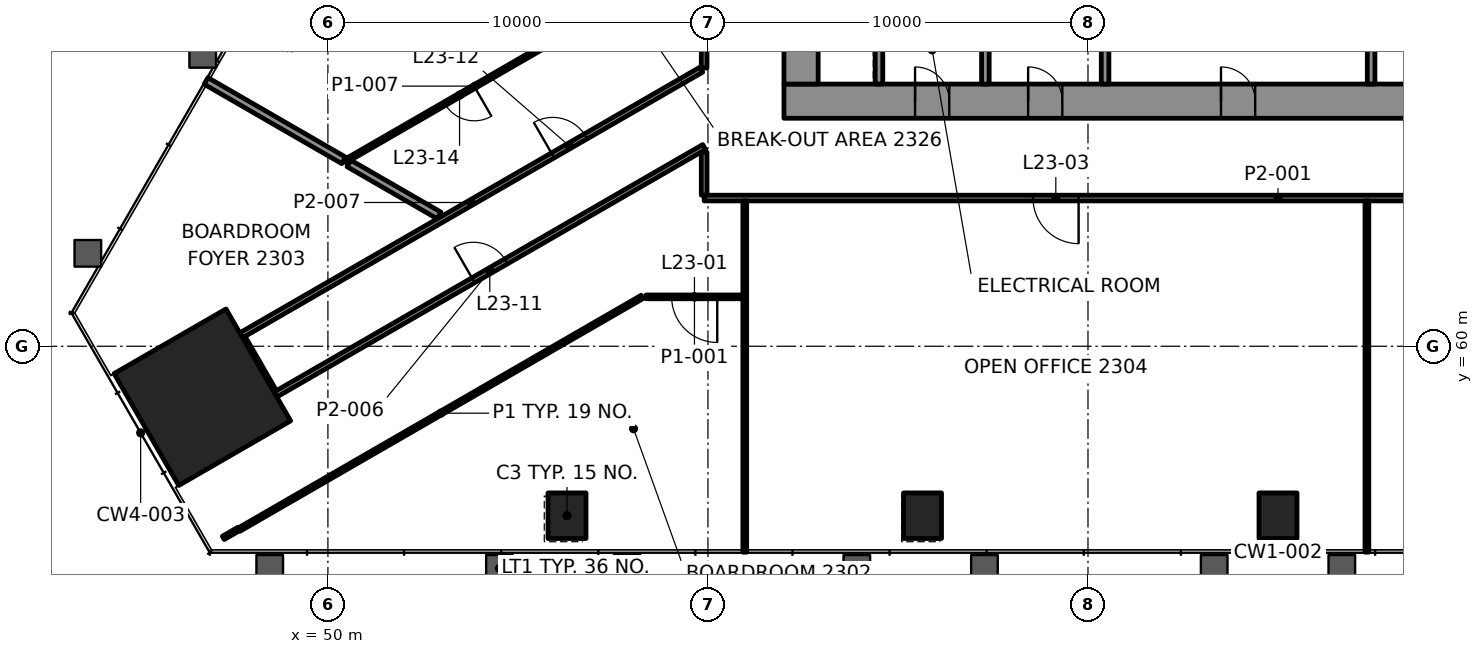
"""IFC4 building model, lengths in metres.
Left out: names, types, materials, properties, quantities, classifications, styles, units other than length and angle.
Written with IfcOpenShell. Run it as: python <this file> out.ifc"""

import sys

from ifc_helpers import new_model, si_unit, direction, frame, frame_2d, origin, origin_2d, place, context, subcontext, project, spatial, rectangle, extrude, element, fill, save


model = new_model("IFC4")
c1 = context("Model", 3, precision=1e-05, world=origin(), true_north=direction((0.0, 1.0)))
c2 = subcontext(c1, "Body", "Model", "MODEL_VIEW")
j1 = project(units=[si_unit("LENGTHUNIT", "METRE"), si_unit("PLANEANGLEUNIT", "RADIAN")], contexts=[c1])
p1 = place(None, origin())
s1 = spatial("IfcSite", under=j1, at=p1, CompositionType="ELEMENT")
p2 = place(p1, origin())
s2 = spatial("IfcBuilding", under=s1, at=p2, CompositionType="ELEMENT")
p3 = place(p2, frame((0.0, 0.0, 103.0)))
s3 = spatial("IfcBuildingStorey", under=s2, at=p3, CompositionType="ELEMENT", Elevation=103.0)
p4 = place(p3, frame((46.696, 58.659, 0.0), z_axis=(0.0, 0.0, 1.0), x_axis=(0.5, -0.866025403784, 0.0)))
e1 = element("IfcColumn", 1, at=p4, inside=s3, PredefinedType="COLUMN", context=c2, shape_type="SweptSolid", body=[
    extrude(rectangle(XDim=3.4, YDim=3.4, at=origin_2d()), origin(), (0.0, 0.0, 1.0), 4.2),
])
for number, where, z_axis, x_axis in (
    (2, (56.292, 55.541, -0.0), (0.0, 0.0, 1.0), (1.0, 0.0, 0.0)),
    (3, (65.646, 55.541, -0.0), (0.0, 0.0, 1.0), (1.0, 0.0, 0.0)),
    (4, (75.0, 55.541, -0.0), (0.0, 0.0, 1.0), (1.0, 0.0, 0.0)),
):
    element("IfcColumn", number, at=place(p3, frame(where, z_axis=z_axis, x_axis=x_axis)), inside=s3, PredefinedType="COLUMN", context=c2, shape_type="SweptSolid", body=[
        extrude(rectangle(XDim=1.0, YDim=1.2, at=origin_2d()), origin(), (0.0, 0.0, 1.0), 4.2),
    ])
p5 = place(p3, frame((62.0, 66.45, 0.0), z_axis=(0.0, 0.0, 1.0), x_axis=(1.0, 0.0, 0.0)))
e5 = element("IfcWall", 5, at=p5, inside=s3, PredefinedType="SHEAR", context=c2, shape_type="SweptSolid", body=[
    extrude(rectangle(XDim=26.0, YDim=0.9, at=frame_2d((13.0, 0.0))), origin(), (0.0, 0.0, 1.0), 4.0),
])
p6 = place(p5, frame((3.45, 0.0, 0.0)))
e6 = element("IfcOpeningElement", 6, at=p6, cuts=e5, PredefinedType="OPENING", context=c2, shape_type="SweptSolid", body=[
    extrude(rectangle(XDim=0.9, YDim=2.1, at=frame_2d((0.45, 1.05))), frame((0.0, 0.46, 0.0), z_axis=(0.0, -1.0, 0.0), x_axis=(1.0, 0.0, 0.0)), (0.0, 0.0, 1.0), 0.92),
])
p7 = place(p5, frame((6.425, 0.0, 0.0)))
e7 = element("IfcOpeningElement", 7, at=p7, cuts=e5, PredefinedType="OPENING", context=c2, shape_type="SweptSolid", body=[
    extrude(rectangle(XDim=0.9, YDim=2.1, at=frame_2d((0.45, 1.05))), frame((0.0, 0.46, 0.0), z_axis=(0.0, -1.0, 0.0), x_axis=(1.0, 0.0, 0.0)), (0.0, 0.0, 1.0), 0.92),
])
p8 = place(p5, frame((11.5, 0.0, 0.0)))
e8 = element("IfcOpeningElement", 8, at=p8, cuts=e5, PredefinedType="OPENING", context=c2, shape_type="SweptSolid", body=[
    extrude(rectangle(XDim=0.9, YDim=2.1, at=frame_2d((0.45, 1.05))), frame((0.0, 0.46, 0.0), z_axis=(0.0, -1.0, 0.0), x_axis=(1.0, 0.0, 0.0)), (0.0, 0.0, 1.0), 0.92),
])
p9 = place(p5, frame((18.5, 0.0, 0.0)))
e9 = element("IfcOpeningElement", 9, at=p9, cuts=e5, PredefinedType="OPENING", context=c2, shape_type="SweptSolid", body=[
    extrude(rectangle(XDim=0.9, YDim=2.1, at=frame_2d((0.45, 1.05))), frame((0.0, 0.46, 0.0), z_axis=(0.0, -1.0, 0.0), x_axis=(1.0, 0.0, 0.0)), (0.0, 0.0, 1.0), 0.92),
])
p10 = place(p5, frame((23.325, 0.0, 0.0)))
e10 = element("IfcOpeningElement", 10, at=p10, cuts=e5, PredefinedType="OPENING", context=c2, shape_type="SweptSolid", body=[
    extrude(rectangle(XDim=0.9, YDim=2.1, at=frame_2d((0.45, 1.05))), frame((0.0, 0.46, 0.0), z_axis=(0.0, -1.0, 0.0), x_axis=(1.0, 0.0, 0.0)), (0.0, 0.0, 1.0), 0.92),
])
p11 = place(p3, frame((62.45, 66.9, 0.0), z_axis=(0.0, 0.0, 1.0), x_axis=(0.0, 1.0, 0.0)))
e11 = element("IfcWall", 11, at=p11, inside=s3, PredefinedType="SHEAR", context=c2, shape_type="SweptSolid", body=[
    extrude(rectangle(XDim=16.2, YDim=0.9, at=frame_2d((8.1, 0.0))), origin(), (0.0, 0.0, 1.0), 4.0),
])
p12 = place(p11, frame((5.5, 0.0, 0.0)))
e12 = element("IfcOpeningElement", 12, at=p12, cuts=e11, PredefinedType="OPENING", context=c2, shape_type="SweptSolid", body=[
    extrude(rectangle(XDim=1.8, YDim=2.1, at=frame_2d((0.9, 1.05))), frame((0.0, 0.46, 0.0), z_axis=(0.0, -1.0, 0.0), x_axis=(1.0, 0.0, 0.0)), (0.0, 0.0, 1.0), 0.92),
])
p13 = place(p3, frame((60.919, 61.3, 0.0), z_axis=(0.0, 0.0, 1.0), x_axis=(-1.0, 0.0, 0.0)))
e13 = element("IfcWall", 13, at=p13, inside=s3, PredefinedType="PARTITIONING", context=c2, shape_type="SweptSolid", body=[
    extrude(rectangle(XDim=2.548, YDim=0.1, at=frame_2d((1.274, 0.0))), origin(), (0.0, 0.0, 1.0), 3.4),
])
p14 = place(p13, frame((0.674, 0.0, 0.0)))
e14 = element("IfcOpeningElement", 14, at=p14, cuts=e13, PredefinedType="OPENING", context=c2, shape_type="SweptSolid", body=[
    extrude(rectangle(XDim=1.2, YDim=2.1, at=frame_2d((0.6, 1.05))), frame((0.0, 0.06, 0.0), z_axis=(0.0, -1.0, 0.0), x_axis=(1.0, 0.0, 0.0)), (0.0, 0.0, 1.0), 0.12),
])
p15 = place(p3, frame((90.099, 63.9, 0.0), z_axis=(0.0, 0.0, 1.0), x_axis=(-1.0, 0.0, 0.0)))
e15 = element("IfcWall", 15, at=p15, inside=s3, PredefinedType="PARTITIONING", context=c2, shape_type="SweptSolid", body=[
    extrude(rectangle(XDim=30.199, YDim=0.15, at=frame_2d((15.099, 0.0))), origin(), (0.0, 0.0, 1.0), 3.4),
])
p16 = place(p15, frame((5.882, 0.0, 0.0)))
e16 = element("IfcOpeningElement", 16, at=p16, cuts=e15, PredefinedType="OPENING", context=c2, shape_type="SweptSolid", body=[
    extrude(rectangle(XDim=1.2, YDim=2.1, at=frame_2d((0.6, 1.05))), frame((0.0, 0.085, 0.0), z_axis=(0.0, -1.0, 0.0), x_axis=(1.0, 0.0, 0.0)), (0.0, 0.0, 1.0), 0.17),
])
p17 = place(p15, frame((20.346, 0.0, 0.0)))
e17 = element("IfcOpeningElement", 17, at=p17, cuts=e15, PredefinedType="OPENING", context=c2, shape_type="SweptSolid", body=[
    extrude(rectangle(XDim=1.2, YDim=2.1, at=frame_2d((0.6, 1.05))), frame((0.0, 0.085, 0.0), z_axis=(0.0, -1.0, 0.0), x_axis=(1.0, 0.0, 0.0)), (0.0, 0.0, 1.0), 0.17),
])
p18 = place(p3, frame((47.667, 55.178, 0.0), z_axis=(0.0, 0.0, 1.0), x_axis=(0.866022223021, 0.500005509203, 0.0)))
e18 = element("IfcWall", 18, at=p18, inside=s3, PredefinedType="PARTITIONING", context=c2, shape_type="SweptSolid", body=[
    extrude(rectangle(XDim=12.244, YDim=0.1, at=frame_2d((6.122, 0.0))), origin(), (0.0, 0.0, 1.0), 3.4),
])
p19 = place(p3, frame((47.248, 54.958, 0.0), z_axis=(0.0, 0.0, 1.0), x_axis=(0.865944638795, 0.50013986298, 0.0)))
e19 = element("IfcWall", 19, at=p19, inside=s3, PredefinedType="PARTITIONING", context=c2, shape_type="SweptSolid", body=[
    extrude(rectangle(XDim=0.472, YDim=0.1, at=frame_2d((0.236, 0.0))), origin(), (0.0, 0.0, 1.0), 3.4),
])
p20 = place(p3, frame((48.619, 58.73, 0.0), z_axis=(0.0, 0.0, 1.0), x_axis=(0.866022351388, 0.500005286868, 0.0)))
e20 = element("IfcWall", 20, at=p20, inside=s3, PredefinedType="PARTITIONING", context=c2, shape_type="SweptSolid", body=[
    extrude(rectangle(XDim=13.026, YDim=0.15, at=frame_2d((6.513, 0.0))), origin(), (0.0, 0.0, 1.0), 3.247),
])
p21 = place(p20, frame((6.013, 0.0, 0.0)))
e21 = element("IfcOpeningElement", 21, at=p21, cuts=e20, PredefinedType="OPENING", context=c2, shape_type="SweptSolid", body=[
    extrude(rectangle(XDim=1.0, YDim=2.1, at=frame_2d((0.5, 1.05))), frame((0.0, 0.085, 0.0), z_axis=(0.0, -1.0, 0.0), x_axis=(1.0, 0.0, 0.0)), (0.0, 0.0, 1.0), 0.17),
])
p22 = place(p3, frame((47.719, 60.289, 0.0), z_axis=(0.0, 0.0, 1.0), x_axis=(0.866025916507, 0.499999111938, 0.0)))
e22 = element("IfcWall", 22, at=p22, inside=s3, PredefinedType="PARTITIONING", context=c2, shape_type="SweptSolid", body=[
    extrude(rectangle(XDim=13.979, YDim=0.15, at=frame_2d((6.99, 0.0))), origin(), (0.0, 0.0, 1.0), 3.4),
])
p23 = place(p22, frame((9.467, 0.0, 0.0)))
e23 = element("IfcOpeningElement", 23, at=p23, cuts=e22, PredefinedType="OPENING", context=c2, shape_type="SweptSolid", body=[
    extrude(rectangle(XDim=1.0, YDim=2.1, at=frame_2d((0.5, 1.05))), frame((0.0, 0.085, 0.0), z_axis=(0.0, -1.0, 0.0), x_axis=(1.0, 0.0, 0.0)), (0.0, 0.0, 1.0), 0.17),
])
p24 = place(p3, frame((57.3, 68.823, 0.0), z_axis=(0.0, 0.0, 1.0), x_axis=(-0.866030292833, -0.499991531824, 0.0)))
e24 = element("IfcWall", 24, at=p24, inside=s3, PredefinedType="PARTITIONING", context=c2, shape_type="SweptSolid", body=[
    extrude(rectangle(XDim=7.906, YDim=0.1, at=frame_2d((3.953, 0.0))), origin(), (0.0, 0.0, 1.0), 3.4),
])
p25 = place(p24, frame((0.229, 0.0, 0.0)))
e25 = element("IfcOpeningElement", 25, at=p25, cuts=e24, PredefinedType="OPENING", context=c2, shape_type="SweptSolid", body=[
    extrude(rectangle(XDim=0.9, YDim=2.1, at=frame_2d((0.45, 1.05))), frame((0.0, 0.06, 0.0), z_axis=(0.0, -1.0, 0.0), x_axis=(1.0, 0.0, 0.0)), (0.0, 0.0, 1.0), 0.12),
])
p26 = place(p24, frame((3.979, 0.0, 0.0)))
e26 = element("IfcOpeningElement", 26, at=p26, cuts=e24, PredefinedType="OPENING", context=c2, shape_type="SweptSolid", body=[
    extrude(rectangle(XDim=0.9, YDim=2.1, at=frame_2d((0.45, 1.05))), frame((0.0, 0.06, 0.0), z_axis=(0.0, -1.0, 0.0), x_axis=(1.0, 0.0, 0.0)), (0.0, 0.0, 1.0), 0.12),
])
for number, where, z_axis, x_axis in (
    (27, (77.339, 54.581, 0.0), (0.0, 0.0, 1.0), (0.0, 1.0, 0.0)),
    (28, (60.969, 54.581, 0.0), (0.0, 0.0, 1.0), (0.0, 1.0, 0.0)),
):
    element("IfcWall", number, at=place(p3, frame(where, z_axis=z_axis, x_axis=x_axis)), inside=s3, PredefinedType="PARTITIONING", context=c2, shape_type="SweptSolid", body=[
        extrude(rectangle(XDim=9.244, YDim=0.1, at=frame_2d((4.622, 0.0))), origin(), (0.0, 0.0, 1.0), 3.165),
    ])
p27 = place(p3, frame((59.9, 63.976, 0.0), z_axis=(0.0, 0.0, 1.0), x_axis=(0.0, 1.0, 0.0)))
e29 = element("IfcWall", 29, at=p27, inside=s3, PredefinedType="PARTITIONING", context=c2, shape_type="SweptSolid", body=[
    extrude(rectangle(XDim=1.131, YDim=0.15, at=frame_2d((0.565, 0.0))), origin(), (0.0, 0.0, 1.0), 3.247),
])
p28 = place(p3, frame((59.9, 67.321, 0.0), z_axis=(0.0, 0.0, 1.0), x_axis=(0.0, 1.0, 0.0)))
e30 = element("IfcWall", 30, at=p28, inside=s3, PredefinedType="PARTITIONING", context=c2, shape_type="SweptSolid", body=[
    extrude(rectangle(XDim=18.778, YDim=0.15, at=frame_2d((9.389, 0.0))), origin(), (0.0, 0.0, 1.0), 3.4),
])
p29 = place(p3, frame((48.58, 58.794, 0.0), z_axis=(0.0, 0.0, 1.0), x_axis=(-0.499944585209, 0.866057395165, 0.0)))
e31 = element("IfcWall", 31, at=p29, inside=s3, PredefinedType="PARTITIONING", context=c2, shape_type="SweptSolid", body=[
    extrude(rectangle(XDim=1.649, YDim=0.15, at=frame_2d((0.825, 0.0))), origin(), (0.0, 0.0, 1.0), 3.247),
])
p30 = place(p3, frame((52.926, 63.441, 0.0), z_axis=(0.0, 0.0, 1.0), x_axis=(-0.866019409031, 0.500010383074, 0.0)))
e32 = element("IfcWall", 32, at=p30, inside=s3, PredefinedType="PARTITIONING", context=c2, shape_type="SweptSolid", body=[
    extrude(rectangle(XDim=2.74, YDim=0.2, at=frame_2d((1.37, 0.0))), origin(), (0.0, 0.0, 1.0), 3.4),
])
p31 = place(p3, frame((50.416, 64.891, 0.0), z_axis=(0.0, 0.0, 1.0), x_axis=(-0.866054366634, 0.499949831517, 0.0)))
e33 = element("IfcWall", 33, at=p31, inside=s3, PredefinedType="PARTITIONING", context=c2, shape_type="SweptSolid", body=[
    extrude(rectangle(XDim=4.183, YDim=0.2, at=frame_2d((2.091, 0.0))), origin(), (0.0, 0.0, 1.0), 3.4),
])
for number, where, z_axis, x_axis in (
    (34, (64.5, 66.9, 0.0), (0.0, 0.0, 1.0), (0.0, 1.0, 0.0)),
    (35, (67.3, 66.9, 0.0), (0.0, 0.0, 1.0), (0.0, 1.0, 0.0)),
    (36, (70.45, 66.9, 0.0), (0.0, 0.0, 1.0), (0.0, 1.0, 0.0)),
    (37, (77.45, 66.9, 0.0), (0.0, 0.0, 1.0), (0.0, 1.0, 0.0)),
):
    element("IfcWall", number, at=place(p3, frame(where, z_axis=z_axis, x_axis=x_axis)), inside=s3, PredefinedType="PARTITIONING", context=c2, shape_type="SweptSolid", body=[
        extrude(rectangle(XDim=1.8, YDim=0.2, at=frame_2d((0.9, 0.0))), origin(), (0.0, 0.0, 1.0), 4.0),
    ])
p32 = place(p14, origin())
e38 = element("IfcDoor", 38, at=p32, inside=s3, OperationType="DOUBLE_DOOR_SINGLE_SWING", PredefinedType="DOOR", context=c2, shape_type="SweptSolid", body=[
    extrude(rectangle(XDim=1.2, YDim=2.1, at=frame_2d((0.6, 1.05))), frame((0.0, 0.025, 0.0), z_axis=(0.0, -1.0, 0.0), x_axis=(1.0, 0.0, 0.0)), (0.0, 0.0, 1.0), 0.05),
])
fill(e14, e38)
p33 = place(p17, origin())
e39 = element("IfcDoor", 39, at=p33, inside=s3, OperationType="DOUBLE_DOOR_SINGLE_SWING", PredefinedType="DOOR", context=c2, shape_type="SweptSolid", body=[
    extrude(rectangle(XDim=1.2, YDim=2.1, at=frame_2d((0.6, 1.05))), frame((0.0, 0.025, 0.0), z_axis=(0.0, -1.0, 0.0), x_axis=(1.0, 0.0, 0.0)), (0.0, 0.0, 1.0), 0.05),
])
fill(e17, e39)
p34 = place(p21, origin())
e40 = element("IfcDoor", 40, at=p34, inside=s3, OperationType="SINGLE_SWING_RIGHT", PredefinedType="DOOR", context=c2, shape_type="SweptSolid", body=[
    extrude(rectangle(XDim=1.0, YDim=2.1, at=frame_2d((0.5, 1.05))), frame((0.0, 0.025, 0.0), z_axis=(0.0, -1.0, 0.0), x_axis=(1.0, 0.0, 0.0)), (0.0, 0.0, 1.0), 0.05),
])
fill(e21, e40)
p35 = place(p23, origin())
e41 = element("IfcDoor", 41, at=p35, inside=s3, OperationType="SINGLE_SWING_LEFT", PredefinedType="DOOR", context=c2, shape_type="SweptSolid", body=[
    extrude(rectangle(XDim=1.0, YDim=2.1, at=frame_2d((0.5, 1.05))), frame((0.0, 0.025, 0.0), z_axis=(0.0, -1.0, 0.0), x_axis=(1.0, 0.0, 0.0)), (0.0, 0.0, 1.0), 0.05),
])
fill(e23, e41)
p36 = place(p26, origin())
e42 = element("IfcDoor", 42, at=p36, inside=s3, OperationType="SINGLE_SWING_RIGHT", PredefinedType="DOOR", context=c2, shape_type="SweptSolid", body=[
    extrude(rectangle(XDim=0.9, YDim=2.1, at=frame_2d((0.45, 1.05))), frame((0.0, 0.025, 0.0), z_axis=(0.0, -1.0, 0.0), x_axis=(1.0, 0.0, 0.0)), (0.0, 0.0, 1.0), 0.05),
])
fill(e26, e42)
p37 = place(p6, origin())
e43 = element("IfcDoor", 43, at=p37, inside=s3, OperationType="SINGLE_SWING_LEFT", PredefinedType="DOOR", context=c2, shape_type="SweptSolid", body=[
    extrude(rectangle(XDim=0.9, YDim=2.1, at=frame_2d((0.45, 1.05))), frame((0.0, 0.17, 0.0), z_axis=(0.0, -1.0, 0.0), x_axis=(1.0, 0.0, 0.0)), (0.0, 0.0, 1.0), 0.34),
])
fill(e6, e43)
p38 = place(p7, origin())
e44 = element("IfcDoor", 44, at=p38, inside=s3, OperationType="SINGLE_SWING_RIGHT", PredefinedType="DOOR", context=c2, shape_type="SweptSolid", body=[
    extrude(rectangle(XDim=0.9, YDim=2.1, at=frame_2d((0.45, 1.05))), frame((0.0, 0.17, 0.0), z_axis=(0.0, -1.0, 0.0), x_axis=(1.0, 0.0, 0.0)), (0.0, 0.0, 1.0), 0.34),
])
fill(e7, e44)
p39 = place(p8, origin())
e45 = element("IfcDoor", 45, at=p39, inside=s3, OperationType="SINGLE_SWING_LEFT", PredefinedType="DOOR", context=c2, shape_type="SweptSolid", body=[
    extrude(rectangle(XDim=0.9, YDim=2.1, at=frame_2d((0.45, 1.05))), frame((0.0, 0.17, 0.0), z_axis=(0.0, -1.0, 0.0), x_axis=(1.0, 0.0, 0.0)), (0.0, 0.0, 1.0), 0.34),
])
fill(e8, e45)
save(model, sys.argv[1])
